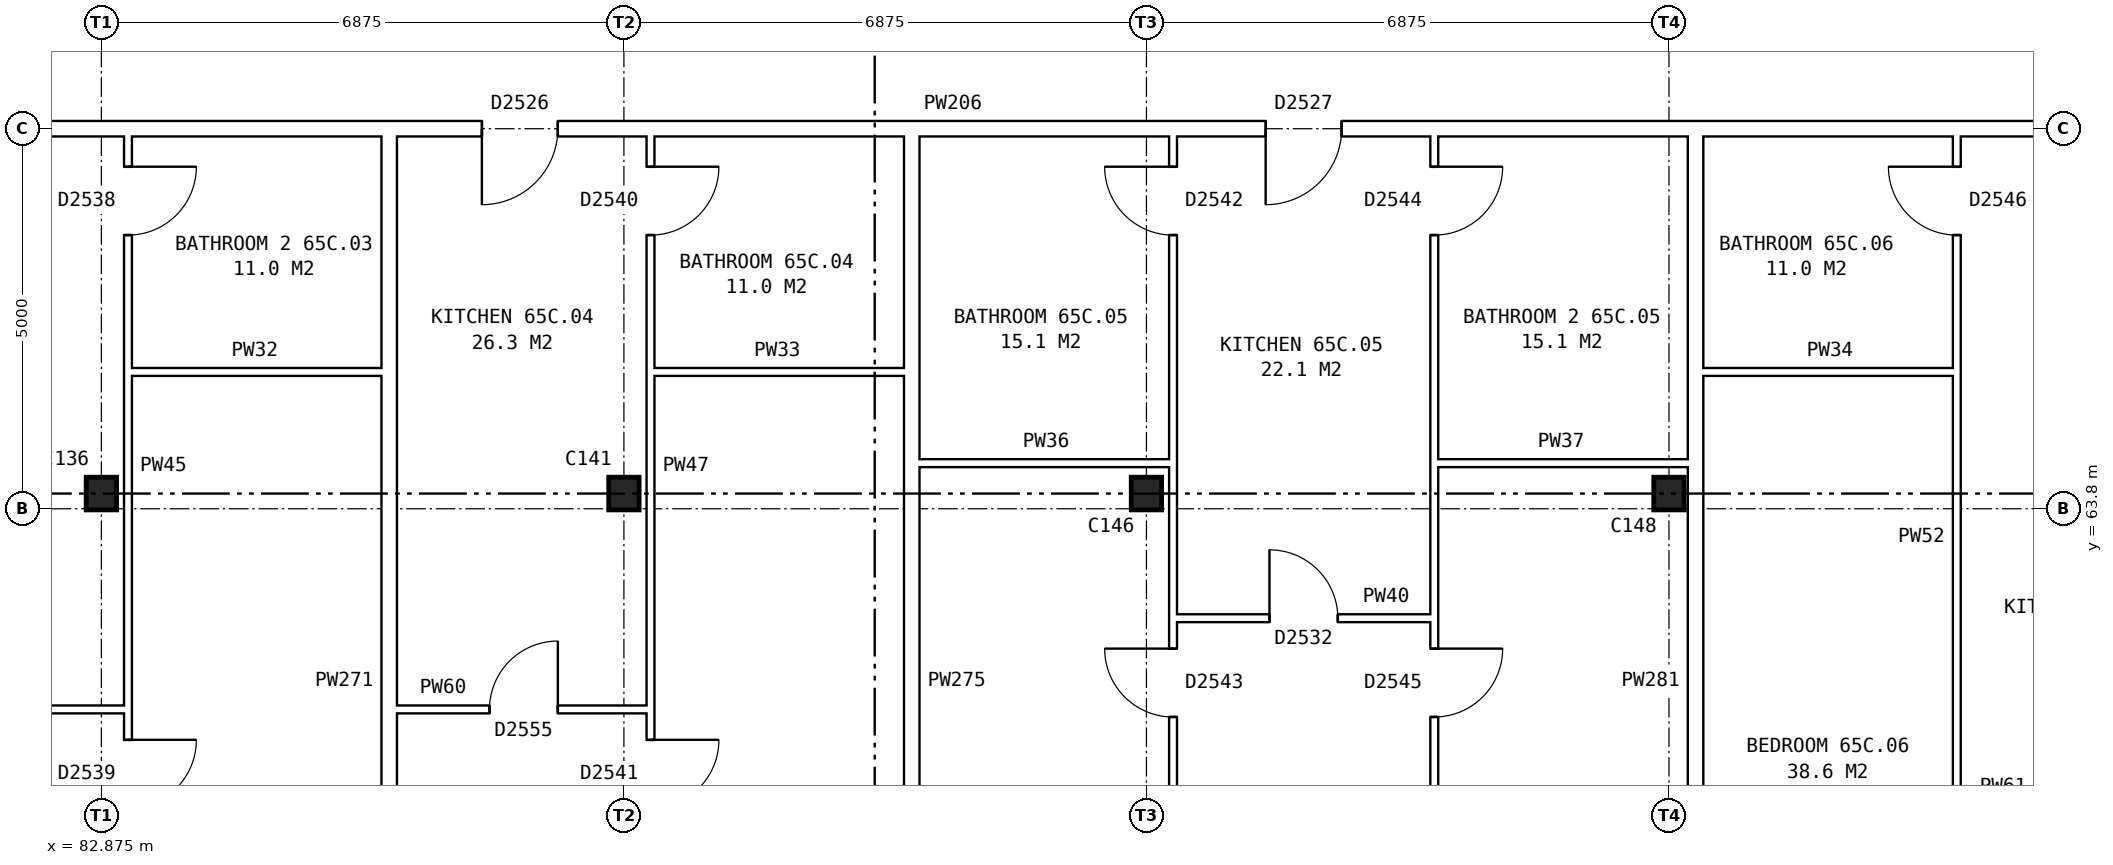
"""IFC4 building model, lengths in metres.
Left out: names, types, materials, properties, quantities, classifications, styles, units other than length and angle.
Written with IfcOpenShell. Run it as: python <this file> out.ifc"""

import sys

from ifc_helpers import new_model, si_unit, direction, frame, frame_2d, origin, origin_2d, place, context, subcontext, project, spatial, rectangle, i_section, extrude, element, fill, save


model = new_model("IFC4")
c1 = context("Model", 3, precision=1e-05, world=origin(), true_north=direction((0.0, 1.0)))
c2 = subcontext(c1, "Body", "Model", "MODEL_VIEW")
j1 = project(units=[si_unit("LENGTHUNIT", "METRE"), si_unit("PLANEANGLEUNIT", "RADIAN")], contexts=[c1])
p1 = place(None, origin())
s1 = spatial("IfcSite", under=j1, at=p1, CompositionType="ELEMENT")
p2 = place(p1, origin())
s2 = spatial("IfcBuilding", under=s1, at=p2, CompositionType="ELEMENT")
p3 = place(p2, frame((0.0, 0.0, 230.7)))
s3 = spatial("IfcBuildingStorey", under=s2, at=p3, CompositionType="ELEMENT", Elevation=230.7)
for number, where, z_axis, x_axis in (
    (1, (82.875, 64.0, 0.0), (0.0, 0.0, 1.0), (1.0, 0.0, 0.0)),
    (2, (89.75, 64.0, 0.0), (0.0, 0.0, 1.0), (1.0, 0.0, 0.0)),
    (3, (96.625, 64.0, 0.0), (0.0, 0.0, 1.0), (1.0, 0.0, 0.0)),
    (4, (103.5, 64.0, 0.0), (0.0, 0.0, 1.0), (1.0, 0.0, 0.0)),
):
    element("IfcColumn", number, at=place(p3, frame(where, z_axis=z_axis, x_axis=x_axis)), inside=s3, PredefinedType="COLUMN", context=c2, shape_type="SweptSolid", body=[
        extrude(i_section(OverallWidth=0.4, OverallDepth=0.43, WebThickness=0.028, FlangeThickness=0.04, at=origin_2d()), origin(), (0.0, 0.0, 1.0), 2.85),
    ])
p4 = place(p3, frame((79.438, 61.16, 0.0), z_axis=(0.0, 0.0, 1.0), x_axis=(1.0, 0.0, 0.0)))
e5 = element("IfcWall", 5, at=p4, inside=s3, PredefinedType="PARTITIONING", context=c2, shape_type="SweptSolid", body=[
    extrude(rectangle(XDim=3.787, YDim=0.1, at=frame_2d((1.894, 0.0))), origin(), (0.0, 0.0, 1.0), 2.85),
])
p5 = place(p4, frame((1.444, 0.0, 0.0)))
e6 = element("IfcOpeningElement", 6, at=p5, cuts=e5, PredefinedType="OPENING", context=c2, shape_type="SweptSolid", body=[
    extrude(rectangle(XDim=0.9, YDim=2.1, at=frame_2d((0.45, 1.05))), frame((0.0, 0.06, 0.0), z_axis=(0.0, -1.0, 0.0), x_axis=(1.0, 0.0, 0.0)), (0.0, 0.0, 1.0), 0.12),
])
p6 = place(p3, frame((86.762, 61.16, 0.0), z_axis=(0.0, 0.0, 1.0), x_axis=(1.0, 0.0, 0.0)))
e7 = element("IfcWall", 7, at=p6, inside=s3, PredefinedType="PARTITIONING", context=c2, shape_type="SweptSolid", body=[
    extrude(rectangle(XDim=3.338, YDim=0.1, at=frame_2d((1.669, 0.0))), origin(), (0.0, 0.0, 1.0), 2.85),
])
p7 = place(p6, frame((1.219, 0.0, 0.0)))
e8 = element("IfcOpeningElement", 8, at=p7, cuts=e7, PredefinedType="OPENING", context=c2, shape_type="SweptSolid", body=[
    extrude(rectangle(XDim=0.9, YDim=2.1, at=frame_2d((0.45, 1.05))), frame((0.0, 0.06, 0.0), z_axis=(0.0, -1.0, 0.0), x_axis=(1.0, 0.0, 0.0)), (0.0, 0.0, 1.0), 0.12),
])
p8 = place(p3, frame((96.975, 62.36, 0.0), z_axis=(0.0, 0.0, 1.0), x_axis=(1.0, 0.0, 0.0)))
e9 = element("IfcWall", 9, at=p8, inside=s3, PredefinedType="PARTITIONING", context=c2, shape_type="SweptSolid", body=[
    extrude(rectangle(XDim=3.437, YDim=0.1, at=frame_2d((1.719, 0.0))), origin(), (0.0, 0.0, 1.0), 2.85),
])
p9 = place(p8, frame((1.269, 0.0, 0.0)))
e10 = element("IfcOpeningElement", 10, at=p9, cuts=e9, PredefinedType="OPENING", context=c2, shape_type="SweptSolid", body=[
    extrude(rectangle(XDim=0.9, YDim=2.1, at=frame_2d((0.45, 1.05))), frame((0.0, 0.06, 0.0), z_axis=(0.0, -1.0, 0.0), x_axis=(1.0, 0.0, 0.0)), (0.0, 0.0, 1.0), 0.12),
])
p10 = place(p3, frame((93.637, 64.4, 0.0), z_axis=(0.0, 0.0, 1.0), x_axis=(1.0, 0.0, 0.0)))
e11 = element("IfcWall", 11, at=p10, inside=s3, PredefinedType="PARTITIONING", context=c2, shape_type="SweptSolid", body=[
    extrude(rectangle(XDim=3.338, YDim=0.1, at=frame_2d((1.669, 0.0))), origin(), (0.0, 0.0, 1.0), 2.85),
])
p11 = place(p3, frame((100.412, 64.4, 0.0), z_axis=(0.0, 0.0, 1.0), x_axis=(1.0, 0.0, 0.0)))
e12 = element("IfcWall", 12, at=p11, inside=s3, PredefinedType="PARTITIONING", context=c2, shape_type="SweptSolid", body=[
    extrude(rectangle(XDim=3.338, YDim=0.1, at=frame_2d((1.669, 0.0))), origin(), (0.0, 0.0, 1.0), 2.85),
])
for number, where, z_axis, x_axis in (
    (13, (83.225, 65.6, 0.0), (0.0, 0.0, 1.0), (1.0, 0.0, 0.0)),
    (14, (90.1, 65.6, 0.0), (0.0, 0.0, 1.0), (1.0, 0.0, 0.0)),
):
    element("IfcWall", number, at=place(p3, frame(where, z_axis=z_axis, x_axis=x_axis)), inside=s3, PredefinedType="PARTITIONING", context=c2, shape_type="SweptSolid", body=[
        extrude(rectangle(XDim=3.337, YDim=0.1, at=frame_2d((1.668, 0.0))), origin(), (0.0, 0.0, 1.0), 2.85),
    ])
p12 = place(p3, frame((103.95, 65.6, 0.0), z_axis=(0.0, 0.0, 1.0), x_axis=(1.0, 0.0, 0.0)))
e15 = element("IfcWall", 15, at=p12, inside=s3, PredefinedType="PARTITIONING", context=c2, shape_type="SweptSolid", body=[
    extrude(rectangle(XDim=3.337, YDim=0.1, at=frame_2d((1.668, 0.0))), origin(), (0.0, 0.0, 1.0), 2.85),
])
p13 = place(p3, frame((75.64, 68.8, 0.0), z_axis=(0.0, 0.0, 1.0), x_axis=(1.0, 0.0, 0.0)))
e16 = element("IfcWall", 16, at=p13, inside=s3, PredefinedType="PARTITIONING", context=c2, shape_type="SweptSolid", body=[
    extrude(rectangle(XDim=55.72, YDim=0.2, at=frame_2d((27.86, 0.0))), origin(), (0.0, 0.0, 1.0), 2.85),
])
p14 = place(p13, frame((5.191, 0.0, 0.0)))
e17 = element("IfcOpeningElement", 17, at=p14, cuts=e16, PredefinedType="OPENING", context=c2, shape_type="SweptSolid", body=[
    extrude(rectangle(XDim=1.0, YDim=2.1, at=frame_2d((0.5, 1.05))), frame((0.0, 0.11, 0.0), z_axis=(0.0, -1.0, 0.0), x_axis=(1.0, 0.0, 0.0)), (0.0, 0.0, 1.0), 0.22),
])
p15 = place(p13, frame((12.241, 0.0, 0.0)))
e18 = element("IfcOpeningElement", 18, at=p15, cuts=e16, PredefinedType="OPENING", context=c2, shape_type="SweptSolid", body=[
    extrude(rectangle(XDim=1.0, YDim=2.1, at=frame_2d((0.5, 1.05))), frame((0.0, 0.11, 0.0), z_axis=(0.0, -1.0, 0.0), x_axis=(1.0, 0.0, 0.0)), (0.0, 0.0, 1.0), 0.22),
])
p16 = place(p13, frame((22.553, 0.0, 0.0)))
e19 = element("IfcOpeningElement", 19, at=p16, cuts=e16, PredefinedType="OPENING", context=c2, shape_type="SweptSolid", body=[
    extrude(rectangle(XDim=1.0, YDim=2.1, at=frame_2d((0.5, 1.05))), frame((0.0, 0.11, 0.0), z_axis=(0.0, -1.0, 0.0), x_axis=(1.0, 0.0, 0.0)), (0.0, 0.0, 1.0), 0.22),
])
p17 = place(p13, frame((32.866, 0.0, 0.0)))
e20 = element("IfcOpeningElement", 20, at=p17, cuts=e16, PredefinedType="OPENING", context=c2, shape_type="SweptSolid", body=[
    extrude(rectangle(XDim=1.0, YDim=2.1, at=frame_2d((0.5, 1.05))), frame((0.0, 0.11, 0.0), z_axis=(0.0, -1.0, 0.0), x_axis=(1.0, 0.0, 0.0)), (0.0, 0.0, 1.0), 0.22),
])
p18 = place(p13, frame((36.303, 0.0, 0.0)))
e21 = element("IfcOpeningElement", 21, at=p18, cuts=e16, PredefinedType="OPENING", context=c2, shape_type="SweptSolid", body=[
    extrude(rectangle(XDim=1.0, YDim=2.1, at=frame_2d((0.5, 1.05))), frame((0.0, 0.11, 0.0), z_axis=(0.0, -1.0, 0.0), x_axis=(1.0, 0.0, 0.0)), (0.0, 0.0, 1.0), 0.22),
])
p19 = place(p13, frame((46.616, 0.0, 0.0)))
e22 = element("IfcOpeningElement", 22, at=p19, cuts=e16, PredefinedType="OPENING", context=c2, shape_type="SweptSolid", body=[
    extrude(rectangle(XDim=1.0, YDim=2.1, at=frame_2d((0.5, 1.05))), frame((0.0, 0.11, 0.0), z_axis=(0.0, -1.0, 0.0), x_axis=(1.0, 0.0, 0.0)), (0.0, 0.0, 1.0), 0.22),
])
p20 = place(p13, frame((53.496, 0.0, 0.0)))
e23 = element("IfcOpeningElement", 23, at=p20, cuts=e16, PredefinedType="OPENING", context=c2, shape_type="SweptSolid", body=[
    extrude(rectangle(XDim=1.0, YDim=2.1, at=frame_2d((0.5, 1.05))), frame((0.0, 0.11, 0.0), z_axis=(0.0, -1.0, 0.0), x_axis=(1.0, 0.0, 0.0)), (0.0, 0.0, 1.0), 0.22),
])
p21 = place(p3, frame((83.225, 54.36, 0.0), z_axis=(0.0, 0.0, 1.0), x_axis=(0.0, 1.0, 0.0)))
e24 = element("IfcWall", 24, at=p21, inside=s3, PredefinedType="PARTITIONING", context=c2, shape_type="SweptSolid", body=[
    extrude(rectangle(XDim=14.34, YDim=0.1, at=frame_2d((7.17, 0.0))), origin(), (0.0, 0.0, 1.0), 2.85),
])
p22 = place(p21, frame((5.5, 0.0, 0.0)))
e25 = element("IfcOpeningElement", 25, at=p22, cuts=e24, PredefinedType="OPENING", context=c2, shape_type="SweptSolid", body=[
    extrude(rectangle(XDim=0.9, YDim=2.1, at=frame_2d((0.45, 1.05))), frame((0.0, 0.06, 0.0), z_axis=(0.0, -1.0, 0.0), x_axis=(1.0, 0.0, 0.0)), (0.0, 0.0, 1.0), 0.12),
])
p23 = place(p21, frame((13.04, 0.0, 0.0)))
e26 = element("IfcOpeningElement", 26, at=p23, cuts=e24, PredefinedType="OPENING", context=c2, shape_type="SweptSolid", body=[
    extrude(rectangle(XDim=0.9, YDim=2.1, at=frame_2d((0.45, 1.05))), frame((0.0, 0.06, 0.0), z_axis=(0.0, -1.0, 0.0), x_axis=(1.0, 0.0, 0.0)), (0.0, 0.0, 1.0), 0.12),
])
p24 = place(p3, frame((86.662, 54.36, 0.0), z_axis=(0.0, 0.0, 1.0), x_axis=(0.0, 1.0, 0.0)))
e27 = element("IfcWall", 27, at=p24, inside=s3, PredefinedType="PARTITIONING", context=c2, shape_type="SweptSolid", body=[
    extrude(rectangle(XDim=14.34, YDim=0.2, at=frame_2d((7.17, 0.0))), origin(), (0.0, 0.0, 1.0), 2.85),
])
p25 = place(p3, frame((90.1, 54.36, 0.0), z_axis=(0.0, 0.0, 1.0), x_axis=(0.0, 1.0, 0.0)))
e28 = element("IfcWall", 28, at=p25, inside=s3, PredefinedType="PARTITIONING", context=c2, shape_type="SweptSolid", body=[
    extrude(rectangle(XDim=14.34, YDim=0.1, at=frame_2d((7.17, 0.0))), origin(), (0.0, 0.0, 1.0), 2.85),
])
p26 = place(p25, frame((5.5, 0.0, 0.0)))
e29 = element("IfcOpeningElement", 29, at=p26, cuts=e28, PredefinedType="OPENING", context=c2, shape_type="SweptSolid", body=[
    extrude(rectangle(XDim=0.9, YDim=2.1, at=frame_2d((0.45, 1.05))), frame((0.0, 0.06, 0.0), z_axis=(0.0, -1.0, 0.0), x_axis=(1.0, 0.0, 0.0)), (0.0, 0.0, 1.0), 0.12),
])
p27 = place(p25, frame((13.04, 0.0, 0.0)))
e30 = element("IfcOpeningElement", 30, at=p27, cuts=e28, PredefinedType="OPENING", context=c2, shape_type="SweptSolid", body=[
    extrude(rectangle(XDim=0.9, YDim=2.1, at=frame_2d((0.45, 1.05))), frame((0.0, 0.06, 0.0), z_axis=(0.0, -1.0, 0.0), x_axis=(1.0, 0.0, 0.0)), (0.0, 0.0, 1.0), 0.12),
])
p28 = place(p3, frame((93.537, 54.36, 0.0), z_axis=(0.0, 0.0, 1.0), x_axis=(0.0, 1.0, 0.0)))
e31 = element("IfcWall", 31, at=p28, inside=s3, PredefinedType="PARTITIONING", context=c2, shape_type="SweptSolid", body=[
    extrude(rectangle(XDim=14.34, YDim=0.2, at=frame_2d((7.17, 0.0))), origin(), (0.0, 0.0, 1.0), 2.85),
])
p29 = place(p3, frame((96.975, 54.36, 0.0), z_axis=(0.0, 0.0, 1.0), x_axis=(0.0, 1.0, 0.0)))
e32 = element("IfcWall", 32, at=p29, inside=s3, PredefinedType="PARTITIONING", context=c2, shape_type="SweptSolid", body=[
    extrude(rectangle(XDim=14.34, YDim=0.1, at=frame_2d((7.17, 0.0))), origin(), (0.0, 0.0, 1.0), 2.85),
])
p30 = place(p29, frame((6.7, 0.0, 0.0)))
e33 = element("IfcOpeningElement", 33, at=p30, cuts=e32, PredefinedType="OPENING", context=c2, shape_type="SweptSolid", body=[
    extrude(rectangle(XDim=0.9, YDim=2.1, at=frame_2d((0.45, 1.05))), frame((0.0, 0.06, 0.0), z_axis=(0.0, -1.0, 0.0), x_axis=(1.0, 0.0, 0.0)), (0.0, 0.0, 1.0), 0.12),
])
p31 = place(p29, frame((13.04, 0.0, 0.0)))
e34 = element("IfcOpeningElement", 34, at=p31, cuts=e32, PredefinedType="OPENING", context=c2, shape_type="SweptSolid", body=[
    extrude(rectangle(XDim=0.9, YDim=2.1, at=frame_2d((0.45, 1.05))), frame((0.0, 0.06, 0.0), z_axis=(0.0, -1.0, 0.0), x_axis=(1.0, 0.0, 0.0)), (0.0, 0.0, 1.0), 0.12),
])
p32 = place(p3, frame((100.412, 54.36, 0.0), z_axis=(0.0, 0.0, 1.0), x_axis=(0.0, 1.0, 0.0)))
e35 = element("IfcWall", 35, at=p32, inside=s3, PredefinedType="PARTITIONING", context=c2, shape_type="SweptSolid", body=[
    extrude(rectangle(XDim=14.34, YDim=0.1, at=frame_2d((7.17, 0.0))), origin(), (0.0, 0.0, 1.0), 2.85),
])
p33 = place(p32, frame((6.7, 0.0, 0.0)))
e36 = element("IfcOpeningElement", 36, at=p33, cuts=e35, PredefinedType="OPENING", context=c2, shape_type="SweptSolid", body=[
    extrude(rectangle(XDim=0.9, YDim=2.1, at=frame_2d((0.45, 1.05))), frame((0.0, 0.06, 0.0), z_axis=(0.0, -1.0, 0.0), x_axis=(1.0, 0.0, 0.0)), (0.0, 0.0, 1.0), 0.12),
])
p34 = place(p32, frame((13.04, 0.0, 0.0)))
e37 = element("IfcOpeningElement", 37, at=p34, cuts=e35, PredefinedType="OPENING", context=c2, shape_type="SweptSolid", body=[
    extrude(rectangle(XDim=0.9, YDim=2.1, at=frame_2d((0.45, 1.05))), frame((0.0, 0.06, 0.0), z_axis=(0.0, -1.0, 0.0), x_axis=(1.0, 0.0, 0.0)), (0.0, 0.0, 1.0), 0.12),
])
p35 = place(p3, frame((103.85, 54.36, 0.0), z_axis=(0.0, 0.0, 1.0), x_axis=(0.0, 1.0, 0.0)))
e38 = element("IfcWall", 38, at=p35, inside=s3, PredefinedType="PARTITIONING", context=c2, shape_type="SweptSolid", body=[
    extrude(rectangle(XDim=14.34, YDim=0.2, at=frame_2d((7.17, 0.0))), origin(), (0.0, 0.0, 1.0), 2.85),
])
p36 = place(p3, frame((107.287, 54.36, 0.0), z_axis=(0.0, 0.0, 1.0), x_axis=(0.0, 1.0, 0.0)))
e39 = element("IfcWall", 39, at=p36, inside=s3, PredefinedType="PARTITIONING", context=c2, shape_type="SweptSolid", body=[
    extrude(rectangle(XDim=14.34, YDim=0.1, at=frame_2d((7.17, 0.0))), origin(), (0.0, 0.0, 1.0), 2.85),
])
p37 = place(p36, frame((4.2, 0.0, 0.0)))
e40 = element("IfcOpeningElement", 40, at=p37, cuts=e39, PredefinedType="OPENING", context=c2, shape_type="SweptSolid", body=[
    extrude(rectangle(XDim=0.9, YDim=2.1, at=frame_2d((0.45, 1.05))), frame((0.0, 0.06, 0.0), z_axis=(0.0, -1.0, 0.0), x_axis=(1.0, 0.0, 0.0)), (0.0, 0.0, 1.0), 0.12),
])
p38 = place(p36, frame((13.04, 0.0, 0.0)))
e41 = element("IfcOpeningElement", 41, at=p38, cuts=e39, PredefinedType="OPENING", context=c2, shape_type="SweptSolid", body=[
    extrude(rectangle(XDim=0.9, YDim=2.1, at=frame_2d((0.45, 1.05))), frame((0.0, 0.06, 0.0), z_axis=(0.0, -1.0, 0.0), x_axis=(1.0, 0.0, 0.0)), (0.0, 0.0, 1.0), 0.12),
])
p39 = place(p22, frame((0.9, 0.0, 0.0), z_axis=(0.0, 0.0, 1.0), x_axis=(-1.0, 0.0, 0.0)))
e42 = element("IfcDoor", 42, at=p39, inside=s3, OperationType="SINGLE_SWING_LEFT", PredefinedType="DOOR", context=c2, shape_type="SweptSolid", body=[
    extrude(rectangle(XDim=0.9, YDim=2.1, at=frame_2d((0.45, 1.05))), frame((0.0, 0.025, 0.0), z_axis=(0.0, -1.0, 0.0), x_axis=(1.0, 0.0, 0.0)), (0.0, 0.0, 1.0), 0.05),
])
fill(e25, e42)
p40 = place(p23, frame((0.9, 0.0, 0.0), z_axis=(0.0, 0.0, 1.0), x_axis=(-1.0, 0.0, 0.0)))
e43 = element("IfcDoor", 43, at=p40, inside=s3, OperationType="SINGLE_SWING_LEFT", PredefinedType="DOOR", context=c2, shape_type="SweptSolid", body=[
    extrude(rectangle(XDim=0.9, YDim=2.1, at=frame_2d((0.45, 1.05))), frame((0.0, 0.025, 0.0), z_axis=(0.0, -1.0, 0.0), x_axis=(1.0, 0.0, 0.0)), (0.0, 0.0, 1.0), 0.05),
])
fill(e26, e43)
p41 = place(p26, frame((0.9, 0.0, 0.0), z_axis=(0.0, 0.0, 1.0), x_axis=(-1.0, 0.0, 0.0)))
e44 = element("IfcDoor", 44, at=p41, inside=s3, OperationType="SINGLE_SWING_LEFT", PredefinedType="DOOR", context=c2, shape_type="SweptSolid", body=[
    extrude(rectangle(XDim=0.9, YDim=2.1, at=frame_2d((0.45, 1.05))), frame((0.0, 0.025, 0.0), z_axis=(0.0, -1.0, 0.0), x_axis=(1.0, 0.0, 0.0)), (0.0, 0.0, 1.0), 0.05),
])
fill(e29, e44)
p42 = place(p15, frame((1.0, 0.0, 0.0), z_axis=(0.0, 0.0, 1.0), x_axis=(-1.0, 0.0, 0.0)))
e45 = element("IfcDoor", 45, at=p42, inside=s3, OperationType="SINGLE_SWING_RIGHT", PredefinedType="DOOR", context=c2, shape_type="SweptSolid", body=[
    extrude(rectangle(XDim=1.0, YDim=2.1, at=frame_2d((0.5, 1.05))), frame((0.0, 0.025, 0.0), z_axis=(0.0, -1.0, 0.0), x_axis=(1.0, 0.0, 0.0)), (0.0, 0.0, 1.0), 0.05),
])
fill(e18, e45)
p43 = place(p7, origin())
e46 = element("IfcDoor", 46, at=p43, inside=s3, OperationType="SINGLE_SWING_RIGHT", PredefinedType="DOOR", context=c2, shape_type="SweptSolid", body=[
    extrude(rectangle(XDim=0.9, YDim=2.1, at=frame_2d((0.45, 1.05))), frame((0.0, 0.025, 0.0), z_axis=(0.0, -1.0, 0.0), x_axis=(1.0, 0.0, 0.0)), (0.0, 0.0, 1.0), 0.05),
])
fill(e8, e46)
p44 = place(p27, frame((0.9, 0.0, 0.0), z_axis=(0.0, 0.0, 1.0), x_axis=(-1.0, 0.0, 0.0)))
e47 = element("IfcDoor", 47, at=p44, inside=s3, OperationType="SINGLE_SWING_LEFT", PredefinedType="DOOR", context=c2, shape_type="SweptSolid", body=[
    extrude(rectangle(XDim=0.9, YDim=2.1, at=frame_2d((0.45, 1.05))), frame((0.0, 0.025, 0.0), z_axis=(0.0, -1.0, 0.0), x_axis=(1.0, 0.0, 0.0)), (0.0, 0.0, 1.0), 0.05),
])
fill(e30, e47)
p45 = place(p30, origin())
e48 = element("IfcDoor", 48, at=p45, inside=s3, OperationType="SINGLE_SWING_RIGHT", PredefinedType="DOOR", context=c2, shape_type="SweptSolid", body=[
    extrude(rectangle(XDim=0.9, YDim=2.1, at=frame_2d((0.45, 1.05))), frame((0.0, 0.025, 0.0), z_axis=(0.0, -1.0, 0.0), x_axis=(1.0, 0.0, 0.0)), (0.0, 0.0, 1.0), 0.05),
])
fill(e33, e48)
p46 = place(p33, frame((0.9, 0.0, 0.0), z_axis=(0.0, 0.0, 1.0), x_axis=(-1.0, 0.0, 0.0)))
e49 = element("IfcDoor", 49, at=p46, inside=s3, OperationType="SINGLE_SWING_LEFT", PredefinedType="DOOR", context=c2, shape_type="SweptSolid", body=[
    extrude(rectangle(XDim=0.9, YDim=2.1, at=frame_2d((0.45, 1.05))), frame((0.0, 0.025, 0.0), z_axis=(0.0, -1.0, 0.0), x_axis=(1.0, 0.0, 0.0)), (0.0, 0.0, 1.0), 0.05),
])
fill(e36, e49)
p47 = place(p16, frame((1.0, 0.0, 0.0), z_axis=(0.0, 0.0, 1.0), x_axis=(-1.0, 0.0, 0.0)))
e50 = element("IfcDoor", 50, at=p47, inside=s3, OperationType="SINGLE_SWING_RIGHT", PredefinedType="DOOR", context=c2, shape_type="SweptSolid", body=[
    extrude(rectangle(XDim=1.0, YDim=2.1, at=frame_2d((0.5, 1.05))), frame((0.0, 0.025, 0.0), z_axis=(0.0, -1.0, 0.0), x_axis=(1.0, 0.0, 0.0)), (0.0, 0.0, 1.0), 0.05),
])
fill(e19, e50)
p48 = place(p9, origin())
e51 = element("IfcDoor", 51, at=p48, inside=s3, OperationType="SINGLE_SWING_LEFT", PredefinedType="DOOR", context=c2, shape_type="SweptSolid", body=[
    extrude(rectangle(XDim=0.9, YDim=2.1, at=frame_2d((0.45, 1.05))), frame((0.0, 0.025, 0.0), z_axis=(0.0, -1.0, 0.0), x_axis=(1.0, 0.0, 0.0)), (0.0, 0.0, 1.0), 0.05),
])
fill(e10, e51)
p49 = place(p31, origin())
e52 = element("IfcDoor", 52, at=p49, inside=s3, OperationType="SINGLE_SWING_RIGHT", PredefinedType="DOOR", context=c2, shape_type="SweptSolid", body=[
    extrude(rectangle(XDim=0.9, YDim=2.1, at=frame_2d((0.45, 1.05))), frame((0.0, 0.025, 0.0), z_axis=(0.0, -1.0, 0.0), x_axis=(1.0, 0.0, 0.0)), (0.0, 0.0, 1.0), 0.05),
])
fill(e34, e52)
p50 = place(p34, frame((0.9, 0.0, 0.0), z_axis=(0.0, 0.0, 1.0), x_axis=(-1.0, 0.0, 0.0)))
e53 = element("IfcDoor", 53, at=p50, inside=s3, OperationType="SINGLE_SWING_LEFT", PredefinedType="DOOR", context=c2, shape_type="SweptSolid", body=[
    extrude(rectangle(XDim=0.9, YDim=2.1, at=frame_2d((0.45, 1.05))), frame((0.0, 0.025, 0.0), z_axis=(0.0, -1.0, 0.0), x_axis=(1.0, 0.0, 0.0)), (0.0, 0.0, 1.0), 0.05),
])
fill(e37, e53)
p51 = place(p38, origin())
e54 = element("IfcDoor", 54, at=p51, inside=s3, OperationType="SINGLE_SWING_RIGHT", PredefinedType="DOOR", context=c2, shape_type="SweptSolid", body=[
    extrude(rectangle(XDim=0.9, YDim=2.1, at=frame_2d((0.45, 1.05))), frame((0.0, 0.025, 0.0), z_axis=(0.0, -1.0, 0.0), x_axis=(1.0, 0.0, 0.0)), (0.0, 0.0, 1.0), 0.05),
])
fill(e41, e54)
save(model, sys.argv[1])
